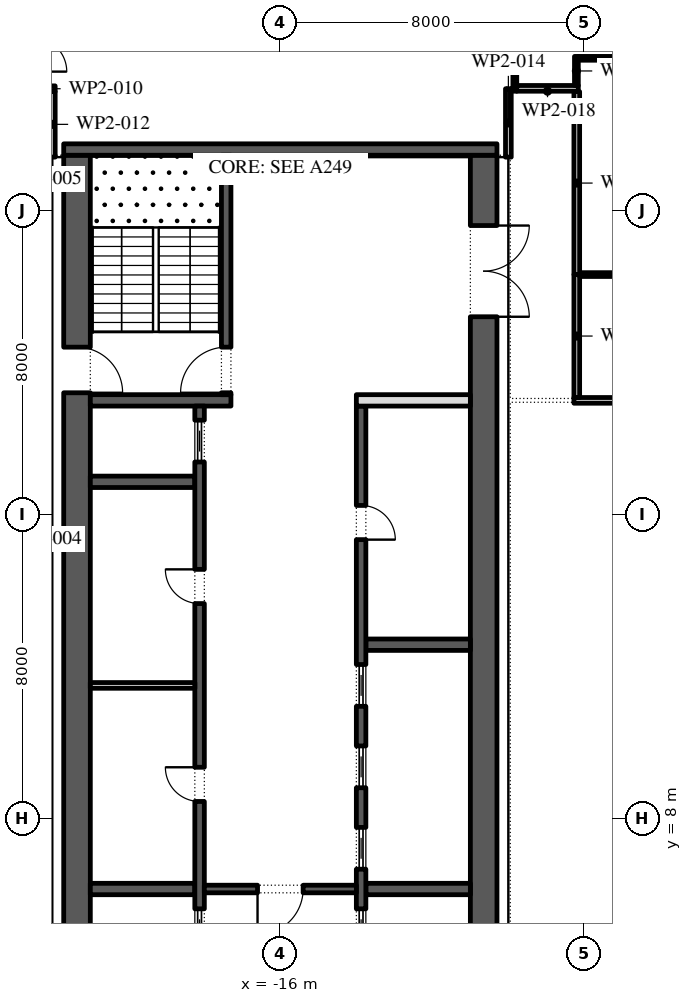
"""IFC4 building model, lengths in metres.
Left out: names, types, materials, properties, quantities, classifications, styles, units other than length and angle.
Written with IfcOpenShell. Run it as: python <this file> out.ifc"""

import sys

from ifc_helpers import new_model, si_unit, direction, frame, frame_2d, origin, place, context, subcontext, project, spatial, rectangle, extrude, element, fill, save


model = new_model("IFC4")
c1 = context("Model", 3, precision=1e-05, world=origin(), true_north=direction((0.0, 1.0)))
c2 = subcontext(c1, "Body", "Model", "MODEL_VIEW")
j1 = project(units=[si_unit("LENGTHUNIT", "METRE"), si_unit("PLANEANGLEUNIT", "RADIAN")], contexts=[c1])
p1 = place(None, origin())
s1 = spatial("IfcSite", under=j1, at=p1, CompositionType="ELEMENT")
p2 = place(p1, origin())
s2 = spatial("IfcBuilding", under=s1, at=p2, CompositionType="ELEMENT")
p3 = place(p2, frame((0.0, 0.0, 209.4)))
s3 = spatial("IfcBuildingStorey", under=s2, at=p3, CompositionType="ELEMENT", Elevation=209.4)
p4 = place(p3, frame((-33.157, 30.092, 0.0), z_axis=(0.0, 0.0, 1.0), x_axis=(0.224950279389, -0.974370243697, 0.0)))
e1 = element("IfcWall", 1, at=p4, inside=s3, PredefinedType="STANDARD", context=c2, shape_type="SweptSolid", body=[
    extrude(rectangle(XDim=49.5, YDim=0.3, at=frame_2d((24.75, 0.0))), origin(), (0.0, 0.0, 1.0), 4.0),
])
p5 = place(p4, frame((2.207, 0.0, 0.0)))
e2 = element("IfcOpeningElement", 2, at=p5, cuts=e1, PredefinedType="OPENING", context=c2, shape_type="SweptSolid", body=[
    extrude(rectangle(XDim=2.4, YDim=3.5, at=frame_2d((1.2, 1.75))), frame((0.0, 0.16, 0.0), z_axis=(0.0, -1.0, 0.0), x_axis=(1.0, 0.0, 0.0)), (0.0, 0.0, 1.0), 0.32),
])
p6 = place(p4, frame((8.121, 0.0, 0.45)))
e3 = element("IfcOpeningElement", 3, at=p6, cuts=e1, PredefinedType="OPENING", context=c2, shape_type="SweptSolid", body=[
    extrude(rectangle(XDim=4.5, YDim=2.825, at=frame_2d((2.25, 1.413))), frame((0.0, 0.16, 0.0), z_axis=(0.0, -1.0, 0.0), x_axis=(1.0, 0.0, 0.0)), (0.0, 0.0, 1.0), 0.32),
])
p7 = place(p4, frame((15.236, 0.0, 0.45)))
e4 = element("IfcOpeningElement", 4, at=p7, cuts=e1, PredefinedType="OPENING", context=c2, shape_type="SweptSolid", body=[
    extrude(rectangle(XDim=4.5, YDim=2.95, at=frame_2d((2.25, 1.475))), frame((0.0, 0.16, 0.0), z_axis=(0.0, -1.0, 0.0), x_axis=(1.0, 0.0, 0.0)), (0.0, 0.0, 1.0), 0.32),
])
p8 = place(p4, frame((22.35, 0.0, 0.45)))
e5 = element("IfcOpeningElement", 5, at=p8, cuts=e1, PredefinedType="OPENING", context=c2, shape_type="SweptSolid", body=[
    extrude(rectangle(XDim=4.5, YDim=3.0, at=frame_2d((2.25, 1.5))), frame((0.0, 0.16, 0.0), z_axis=(0.0, -1.0, 0.0), x_axis=(1.0, 0.0, 0.0)), (0.0, 0.0, 1.0), 0.32),
])
p9 = place(p4, frame((30.514, 0.0, 0.0)))
e6 = element("IfcOpeningElement", 6, at=p9, cuts=e1, PredefinedType="OPENING", context=c2, shape_type="SweptSolid", body=[
    extrude(rectangle(XDim=2.4, YDim=3.5, at=frame_2d((1.2, 1.75))), frame((0.0, 0.16, 0.0), z_axis=(0.0, -1.0, 0.0), x_axis=(1.0, 0.0, 0.0)), (0.0, 0.0, 1.0), 0.32),
])
p10 = place(p4, frame((36.579, 0.0, 0.45)))
e7 = element("IfcOpeningElement", 7, at=p10, cuts=e1, PredefinedType="OPENING", context=c2, shape_type="SweptSolid", body=[
    extrude(rectangle(XDim=4.5, YDim=3.05, at=frame_2d((2.25, 1.525))), frame((0.0, 0.16, 0.0), z_axis=(0.0, -1.0, 0.0), x_axis=(1.0, 0.0, 0.0)), (0.0, 0.0, 1.0), 0.32),
])
p11 = place(p4, frame((43.693, 0.0, 0.45)))
e8 = element("IfcOpeningElement", 8, at=p11, cuts=e1, PredefinedType="OPENING", context=c2, shape_type="SweptSolid", body=[
    extrude(rectangle(XDim=4.5, YDim=3.05, at=frame_2d((2.25, 1.525))), frame((0.0, 0.16, 0.0), z_axis=(0.0, -1.0, 0.0), x_axis=(1.0, 0.0, 0.0)), (0.0, 0.0, 1.0), 0.32),
])
p12 = place(p3, frame((-21.35, -2.45, 0.0), z_axis=(0.0, 0.0, 1.0), x_axis=(0.0, 1.0, 0.0)))
e9 = element("IfcWall", 9, at=p12, inside=s3, PredefinedType="SHEAR", context=c2, shape_type="SweptSolid", body=[
    extrude(rectangle(XDim=27.9, YDim=0.7, at=frame_2d((13.95, 0.0))), origin(), (0.0, 0.0, 1.0), 4.0),
])
p13 = place(p12, frame((5.05, 0.0, 0.0)))
e10 = element("IfcOpeningElement", 10, at=p13, cuts=e9, PredefinedType="OPENING", context=c2, shape_type="SweptSolid", body=[
    extrude(rectangle(XDim=1.2, YDim=2.1, at=frame_2d((0.6, 1.05))), frame((0.0, 0.36, 0.0), z_axis=(0.0, -1.0, 0.0), x_axis=(1.0, 0.0, 0.0)), (0.0, 0.0, 1.0), 0.72),
])
p14 = place(p12, frame((21.65, 0.0, 0.0)))
e11 = element("IfcOpeningElement", 11, at=p14, cuts=e9, PredefinedType="OPENING", context=c2, shape_type="SweptSolid", body=[
    extrude(rectangle(XDim=1.2, YDim=2.1, at=frame_2d((0.6, 1.05))), frame((0.0, 0.36, 0.0), z_axis=(0.0, -1.0, 0.0), x_axis=(1.0, 0.0, 0.0)), (0.0, 0.0, 1.0), 0.72),
])
p15 = place(p3, frame((-10.65, -2.45, 0.0), z_axis=(0.0, 0.0, 1.0), x_axis=(0.0, 1.0, 0.0)))
e12 = element("IfcWall", 12, at=p15, inside=s3, PredefinedType="SHEAR", context=c2, shape_type="SweptSolid", body=[
    extrude(rectangle(XDim=27.9, YDim=0.7, at=frame_2d((13.95, 0.0))), origin(), (0.0, 0.0, 1.0), 4.0),
])
p16 = place(p15, frame((23.65, 0.0, 0.0)))
e13 = element("IfcOpeningElement", 13, at=p16, cuts=e12, PredefinedType="OPENING", context=c2, shape_type="SweptSolid", body=[
    extrude(rectangle(XDim=2.4, YDim=2.1, at=frame_2d((1.2, 1.05))), frame((0.0, 0.36, 0.0), z_axis=(0.0, -1.0, 0.0), x_axis=(1.0, 0.0, 0.0)), (0.0, 0.0, 1.0), 0.72),
])
p17 = place(p15, frame((0.788, 0.0, 0.0)))
e14 = element("IfcOpeningElement", 14, at=p17, cuts=e12, PredefinedType="OPENING", context=c2, shape_type="SweptSolid", body=[
    extrude(rectangle(XDim=0.9, YDim=2.1, at=frame_2d((0.45, 1.05))), frame((0.0, 0.36, 0.0), z_axis=(0.0, -1.0, 0.0), x_axis=(1.0, 0.0, 0.0)), (0.0, 0.0, 1.0), 0.72),
])
p18 = place(p15, frame((3.962, 0.0, 0.0)))
e15 = element("IfcOpeningElement", 15, at=p18, cuts=e12, PredefinedType="OPENING", context=c2, shape_type="SweptSolid", body=[
    extrude(rectangle(XDim=1.0, YDim=2.1, at=frame_2d((0.5, 1.05))), frame((0.0, 0.36, 0.0), z_axis=(0.0, -1.0, 0.0), x_axis=(1.0, 0.0, 0.0)), (0.0, 0.0, 1.0), 0.72),
])
p19 = place(p3, frame((-21.7, 25.6, 0.0), z_axis=(0.0, 0.0, 1.0), x_axis=(1.0, 0.0, 0.0)))
e16 = element("IfcWall", 16, at=p19, inside=s3, PredefinedType="SHEAR", context=c2, shape_type="SweptSolid", body=[
    extrude(rectangle(XDim=11.4, YDim=0.3, at=frame_2d((5.7, 0.0))), origin(), (0.0, 0.0, 1.0), 4.0),
])
p20 = place(p3, frame((-21.0, 19.0, 0.0), z_axis=(0.0, 0.0, 1.0), x_axis=(1.0, 0.0, 0.0)))
e17 = element("IfcWall", 17, at=p20, inside=s3, PredefinedType="SHEAR", context=c2, shape_type="SweptSolid", body=[
    extrude(rectangle(XDim=3.7, YDim=0.3, at=frame_2d((1.85, 0.0))), origin(), (0.0, 0.0, 1.0), 4.0),
])
p21 = place(p3, frame((-17.425, 19.15, 0.0), z_axis=(0.0, 0.0, 1.0), x_axis=(0.0, 1.0, 0.0)))
e18 = element("IfcWall", 18, at=p21, inside=s3, PredefinedType="SHEAR", context=c2, shape_type="SweptSolid", body=[
    extrude(rectangle(XDim=6.3, YDim=0.25, at=frame_2d((3.15, 0.0))), origin(), (0.0, 0.0, 1.0), 4.0),
])
p22 = place(p21, frame((0.05, 0.0, 0.0)))
e19 = element("IfcOpeningElement", 19, at=p22, cuts=e18, PredefinedType="OPENING", context=c2, shape_type="SweptSolid", body=[
    extrude(rectangle(XDim=1.2, YDim=2.1, at=frame_2d((0.6, 1.05))), frame((0.0, 0.135, 0.0), z_axis=(0.0, -1.0, 0.0), x_axis=(1.0, 0.0, 0.0)), (0.0, 0.0, 1.0), 0.27),
])
for number, where, z_axis, x_axis in (
    (20, (-21.0, 6.143, 0.0), (0.0, 0.0, 1.0), (1.0, 0.0, 0.0)),
    (21, (-21.0, 16.857, 0.0), (0.0, 0.0, 1.0), (1.0, 0.0, 0.0)),
):
    element("IfcWall", number, at=place(p3, frame(where, z_axis=z_axis, x_axis=x_axis)), inside=s3, PredefinedType="SHEAR", context=c2, shape_type="SweptSolid", body=[
        extrude(rectangle(XDim=2.75, YDim=0.3, at=frame_2d((1.375, 0.0))), origin(), (0.0, 0.0, 1.0), 4.0),
    ])
p23 = place(p3, frame((-18.125, 4.15, 0.0), z_axis=(0.0, 0.0, 1.0), x_axis=(0.0, 1.0, 0.0)))
e22 = element("IfcWall", 22, at=p23, inside=s3, PredefinedType="SHEAR", context=c2, shape_type="SweptSolid", body=[
    extrude(rectangle(XDim=14.7, YDim=0.25, at=frame_2d((7.35, 0.0))), origin(), (0.0, 0.0, 1.0), 4.0),
])
p24 = place(p23, frame((4.296, 0.0, 0.0)))
e23 = element("IfcOpeningElement", 23, at=p24, cuts=e22, PredefinedType="OPENING", context=c2, shape_type="SweptSolid", body=[
    extrude(rectangle(XDim=0.9, YDim=2.1, at=frame_2d((0.45, 1.05))), frame((0.0, 0.135, 0.0), z_axis=(0.0, -1.0, 0.0), x_axis=(1.0, 0.0, 0.0)), (0.0, 0.0, 1.0), 0.27),
])
p25 = place(p23, frame((9.504, 0.0, 0.0)))
e24 = element("IfcOpeningElement", 24, at=p25, cuts=e22, PredefinedType="OPENING", context=c2, shape_type="SweptSolid", body=[
    extrude(rectangle(XDim=0.9, YDim=2.1, at=frame_2d((0.45, 1.05))), frame((0.0, 0.135, 0.0), z_axis=(0.0, -1.0, 0.0), x_axis=(1.0, 0.0, 0.0)), (0.0, 0.0, 1.0), 0.27),
])
p26 = place(p23, frame((0.371, 0.0, 0.0)))
e25 = element("IfcOpeningElement", 25, at=p26, cuts=e22, PredefinedType="OPENING", context=c2, shape_type="SweptSolid", body=[
    extrude(rectangle(XDim=1.1, YDim=2.1, at=frame_2d((0.55, 1.05))), frame((0.0, 0.135, 0.0), z_axis=(0.0, -1.0, 0.0), x_axis=(1.0, 0.0, 0.0)), (0.0, 0.0, 1.0), 0.27),
])
p27 = place(p23, frame((13.229, 0.0, 0.0)))
e26 = element("IfcOpeningElement", 26, at=p27, cuts=e22, PredefinedType="OPENING", context=c2, shape_type="SweptSolid", body=[
    extrude(rectangle(XDim=1.1, YDim=2.1, at=frame_2d((0.55, 1.05))), frame((0.0, 0.135, 0.0), z_axis=(0.0, -1.0, 0.0), x_axis=(1.0, 0.0, 0.0)), (0.0, 0.0, 1.0), 0.27),
])
p28 = place(p3, frame((-21.0, 11.5, 0.0), z_axis=(0.0, 0.0, 1.0), x_axis=(1.0, 0.0, 0.0)))
e27 = element("IfcWall", 27, at=p28, inside=s3, PredefinedType="PARTITIONING", context=c2, shape_type="SweptSolid", body=[
    extrude(rectangle(XDim=2.75, YDim=0.15, at=frame_2d((1.375, 0.0))), origin(), (0.0, 0.0, 1.0), 4.0),
])
for number, where, z_axis, x_axis in (
    (28, (-13.75, 6.143, 0.0), (0.0, 0.0, 1.0), (1.0, 0.0, 0.0)),
    (29, (-13.75, 12.571, 0.0), (0.0, 0.0, 1.0), (1.0, 0.0, 0.0)),
):
    element("IfcWall", number, at=place(p3, frame(where, z_axis=z_axis, x_axis=x_axis)), inside=s3, PredefinedType="SHEAR", context=c2, shape_type="SweptSolid", body=[
        extrude(rectangle(XDim=2.75, YDim=0.3, at=frame_2d((1.375, 0.0))), origin(), (0.0, 0.0, 1.0), 4.0),
    ])
p29 = place(p3, frame((-13.875, -2.45, 0.0), z_axis=(0.0, 0.0, 1.0), x_axis=(0.0, 1.0, 0.0)))
e30 = element("IfcWall", 30, at=p29, inside=s3, PredefinedType="SHEAR", context=c2, shape_type="SweptSolid", body=[
    extrude(rectangle(XDim=21.3, YDim=0.25, at=frame_2d((10.65, 0.0))), origin(), (0.0, 0.0, 1.0), 4.0),
])
p30 = place(p29, frame((17.786, 0.0, 0.0)))
e31 = element("IfcOpeningElement", 31, at=p30, cuts=e30, PredefinedType="OPENING", context=c2, shape_type="SweptSolid", body=[
    extrude(rectangle(XDim=0.9, YDim=2.1, at=frame_2d((0.45, 1.05))), frame((0.0, 0.135, 0.0), z_axis=(0.0, -1.0, 0.0), x_axis=(1.0, 0.0, 0.0)), (0.0, 0.0, 1.0), 0.27),
])
p31 = place(p29, frame((6.971, 0.0, 0.0)))
e32 = element("IfcOpeningElement", 32, at=p31, cuts=e30, PredefinedType="OPENING", context=c2, shape_type="SweptSolid", body=[
    extrude(rectangle(XDim=1.1, YDim=2.1, at=frame_2d((0.55, 1.05))), frame((0.0, 0.135, 0.0), z_axis=(0.0, -1.0, 0.0), x_axis=(1.0, 0.0, 0.0)), (0.0, 0.0, 1.0), 0.27),
])
p32 = place(p29, frame((9.114, 0.0, 0.0)))
e33 = element("IfcOpeningElement", 33, at=p32, cuts=e30, PredefinedType="OPENING", context=c2, shape_type="SweptSolid", body=[
    extrude(rectangle(XDim=1.1, YDim=2.1, at=frame_2d((0.55, 1.05))), frame((0.0, 0.135, 0.0), z_axis=(0.0, -1.0, 0.0), x_axis=(1.0, 0.0, 0.0)), (0.0, 0.0, 1.0), 0.27),
])
p33 = place(p29, frame((11.257, 0.0, 0.0)))
e34 = element("IfcOpeningElement", 34, at=p33, cuts=e30, PredefinedType="OPENING", context=c2, shape_type="SweptSolid", body=[
    extrude(rectangle(XDim=1.1, YDim=2.1, at=frame_2d((0.55, 1.05))), frame((0.0, 0.135, 0.0), z_axis=(0.0, -1.0, 0.0), x_axis=(1.0, 0.0, 0.0)), (0.0, 0.0, 1.0), 0.27),
])
p34 = place(p29, frame((13.4, 0.0, 0.0)))
e35 = element("IfcOpeningElement", 35, at=p34, cuts=e30, PredefinedType="OPENING", context=c2, shape_type="SweptSolid", body=[
    extrude(rectangle(XDim=1.1, YDim=2.1, at=frame_2d((0.55, 1.05))), frame((0.0, 0.135, 0.0), z_axis=(0.0, -1.0, 0.0), x_axis=(1.0, 0.0, 0.0)), (0.0, 0.0, 1.0), 0.27),
])
p35 = place(p3, frame((-14.0, 19.0, 0.0), z_axis=(0.0, 0.0, 1.0), x_axis=(1.0, 0.0, 0.0)))
e36 = element("IfcWall", 36, at=p35, inside=s3, PredefinedType="PARTITIONING", context=c2, shape_type="SweptSolid", body=[
    extrude(rectangle(XDim=3.0, YDim=0.3, at=frame_2d((1.5, 0.0))), origin(), (0.0, 0.0, 1.0), 4.0),
])
p36 = place(p3, frame((-18.0, 6.143, 0.0), z_axis=(0.0, 0.0, 1.0), x_axis=(1.0, 0.0, 0.0)))
e37 = element("IfcWall", 37, at=p36, inside=s3, PredefinedType="SHEAR", context=c2, shape_type="SweptSolid", body=[
    extrude(rectangle(XDim=4.0, YDim=0.2, at=frame_2d((2.0, 0.0))), origin(), (0.0, 0.0, 1.0), 4.0),
])
p37 = place(p36, frame((1.4, 0.0, 0.0)))
e38 = element("IfcOpeningElement", 38, at=p37, cuts=e37, PredefinedType="OPENING", context=c2, shape_type="SweptSolid", body=[
    extrude(rectangle(XDim=1.2, YDim=2.1, at=frame_2d((0.6, 1.05))), frame((0.0, 0.11, 0.0), z_axis=(0.0, -1.0, 0.0), x_axis=(1.0, 0.0, 0.0)), (0.0, 0.0, 1.0), 0.22),
])
p38 = place(p3, frame((-22.47, 27.2, 0.0), z_axis=(0.0, 0.0, 1.0), x_axis=(1.0, 0.0, 0.0)))
e39 = element("IfcWall", 39, at=p38, inside=s3, PredefinedType="PARTITIONING", context=c2, shape_type="SweptSolid", body=[
    extrude(rectangle(XDim=0.545, YDim=0.15, at=frame_2d((0.272, 0.0))), origin(), (0.0, 0.0, 1.0), 4.0),
])
p39 = place(p3, frame((-22.0, 27.125, 0.0), z_axis=(0.0, 0.0, 1.0), x_axis=(0.0, -1.0, 0.0)))
e40 = element("IfcWall", 40, at=p39, inside=s3, PredefinedType="PARTITIONING", context=c2, shape_type="SweptSolid", body=[
    extrude(rectangle(XDim=1.725, YDim=0.15, at=frame_2d((0.863, 0.0))), origin(), (0.0, 0.0, 1.0), 4.0),
])
p40 = place(p3, frame((-10.0, 25.4, 0.0), z_axis=(0.0, 0.0, 1.0), x_axis=(0.0, 1.0, 0.0)))
e41 = element("IfcWall", 41, at=p40, inside=s3, PredefinedType="PARTITIONING", context=c2, shape_type="SweptSolid", body=[
    extrude(rectangle(XDim=1.8, YDim=0.15, at=frame_2d((0.9, 0.0))), origin(), (0.0, 0.0, 1.0), 4.0),
])
p41 = place(p3, frame((-9.83, 27.135, 0.0), z_axis=(0.0, 0.0, 1.0), x_axis=(0.0, 1.0, 0.0)))
e42 = element("IfcWall", 42, at=p41, inside=s3, PredefinedType="PARTITIONING", context=c2, shape_type="SweptSolid", body=[
    extrude(rectangle(XDim=3.335, YDim=0.1, at=frame_2d((1.667, 0.0))), origin(), (0.0, 0.0, 1.0), 4.0),
])
p42 = place(p3, frame((-9.78, 27.21, 0.0), z_axis=(0.0, 0.0, 1.0), x_axis=(1.0, 0.0, 0.0)))
e43 = element("IfcWall", 43, at=p42, inside=s3, PredefinedType="PARTITIONING", context=c2, shape_type="SweptSolid", body=[
    extrude(rectangle(XDim=1.62, YDim=0.15, at=frame_2d((0.81, 0.0))), origin(), (0.0, 0.0, 1.0), 4.0),
])
p43 = place(p3, frame((-8.21, 27.285, 0.0), z_axis=(0.0, 0.0, 1.0), x_axis=(0.0, 1.0, 0.0)))
e44 = element("IfcWall", 44, at=p43, inside=s3, PredefinedType="PARTITIONING", context=c2, shape_type="SweptSolid", body=[
    extrude(rectangle(XDim=0.765, YDim=0.1, at=frame_2d((0.383, 0.0))), origin(), (0.0, 0.0, 1.0), 4.0),
])
p44 = place(p3, frame((-8.16, 28.0, 0.0), z_axis=(0.0, 0.0, 1.0), x_axis=(1.0, 0.0, 0.0)))
e45 = element("IfcWall", 45, at=p44, inside=s3, PredefinedType="PARTITIONING", context=c2, shape_type="SweptSolid", body=[
    extrude(rectangle(XDim=7.245, YDim=0.1, at=frame_2d((3.623, 0.0))), origin(), (0.0, 0.0, 1.0), 4.0),
])
p45 = place(p3, frame((-8.275, 19.0, 0.0), z_axis=(0.0, 0.0, 1.0), x_axis=(1.0, 0.0, 0.0)))
e46 = element("IfcWall", 46, at=p45, inside=s3, PredefinedType="PARTITIONING", context=c2, shape_type="SweptSolid", body=[
    extrude(rectangle(XDim=7.36, YDim=0.15, at=frame_2d((3.68, 0.0))), origin(), (0.0, 0.0, 1.0), 4.0),
])
p46 = place(p45, frame((1.635, 0.0, 0.0)))
e47 = element("IfcOpeningElement", 47, at=p46, cuts=e46, PredefinedType="OPENING", context=c2, shape_type="SweptSolid", body=[
    extrude(rectangle(XDim=1.0, YDim=2.1, at=frame_2d((0.5, 1.05))), frame((0.0, 0.085, 0.0), z_axis=(0.0, -1.0, 0.0), x_axis=(1.0, 0.0, 0.0)), (0.0, 0.0, 1.0), 0.17),
])
p47 = place(p3, frame((-8.2, 22.31, 0.0), z_axis=(0.0, 0.0, 1.0), x_axis=(0.0, -1.0, 0.0)))
e48 = element("IfcWall", 48, at=p47, inside=s3, PredefinedType="PARTITIONING", context=c2, shape_type="SweptSolid", body=[
    extrude(rectangle(XDim=3.235, YDim=0.15, at=frame_2d((1.618, 0.0))), origin(), (0.0, 0.0, 1.0), 4.0),
])
p48 = place(p3, frame((-8.125, 22.31, 0.0), z_axis=(0.0, 0.0, 1.0), x_axis=(1.0, 0.0, 0.0)))
e49 = element("IfcWall", 49, at=p48, inside=s3, PredefinedType="PARTITIONING", context=c2, shape_type="SweptSolid", body=[
    extrude(rectangle(XDim=7.21, YDim=0.1, at=frame_2d((3.605, 0.0))), origin(), (0.0, 0.0, 1.0), 4.0),
])
p49 = place(p3, frame((-8.2, 27.125, 0.0), z_axis=(0.0, 0.0, 1.0), x_axis=(0.0, -1.0, 0.0)))
e50 = element("IfcWall", 50, at=p49, inside=s3, PredefinedType="PARTITIONING", context=c2, shape_type="SweptSolid", body=[
    extrude(rectangle(XDim=4.815, YDim=0.15, at=frame_2d((2.407, 0.0))), origin(), (0.0, 0.0, 1.0), 4.0),
])
p50 = place(p24, origin())
e51 = element("IfcDoor", 51, at=p50, inside=s3, OperationType="SINGLE_SWING_LEFT", PredefinedType="DOOR", context=c2, shape_type="SweptSolid", body=[
    extrude(rectangle(XDim=0.9, YDim=2.1, at=frame_2d((0.45, 1.05))), frame((0.0, 0.125, 0.0), z_axis=(0.0, -1.0, 0.0), x_axis=(1.0, 0.0, 0.0)), (0.0, 0.0, 1.0), 0.05),
])
fill(e23, e51)
p51 = place(p25, origin())
e52 = element("IfcDoor", 52, at=p51, inside=s3, OperationType="SINGLE_SWING_LEFT", PredefinedType="DOOR", context=c2, shape_type="SweptSolid", body=[
    extrude(rectangle(XDim=0.9, YDim=2.1, at=frame_2d((0.45, 1.05))), frame((0.0, 0.125, 0.0), z_axis=(0.0, -1.0, 0.0), x_axis=(1.0, 0.0, 0.0)), (0.0, 0.0, 1.0), 0.05),
])
fill(e24, e52)
p52 = place(p26, origin())
e53 = element("IfcDoor", 53, at=p52, inside=s3, OperationType="SLIDING_TO_LEFT", PredefinedType="DOOR", context=c2, shape_type="SweptSolid", body=[
    extrude(rectangle(XDim=1.1, YDim=2.1, at=frame_2d((0.55, 1.05))), frame((0.0, 0.025, 0.0), z_axis=(0.0, -1.0, 0.0), x_axis=(1.0, 0.0, 0.0)), (0.0, 0.0, 1.0), 0.05),
])
fill(e25, e53)
p53 = place(p27, origin())
e54 = element("IfcDoor", 54, at=p53, inside=s3, OperationType="SLIDING_TO_LEFT", PredefinedType="DOOR", context=c2, shape_type="SweptSolid", body=[
    extrude(rectangle(XDim=1.1, YDim=2.1, at=frame_2d((0.55, 1.05))), frame((0.0, 0.025, 0.0), z_axis=(0.0, -1.0, 0.0), x_axis=(1.0, 0.0, 0.0)), (0.0, 0.0, 1.0), 0.05),
])
fill(e26, e54)
p54 = place(p30, frame((0.9, -0.2, 0.0), z_axis=(0.0, 0.0, 1.0), x_axis=(-1.0, 0.0, 0.0)))
e55 = element("IfcDoor", 55, at=p54, inside=s3, OperationType="SINGLE_SWING_LEFT", PredefinedType="DOOR", context=c2, shape_type="SweptSolid", body=[
    extrude(rectangle(XDim=0.9, YDim=2.1, at=frame_2d((0.45, 1.05))), frame((0.0, -0.075, 0.0), z_axis=(0.0, -1.0, 0.0), x_axis=(1.0, 0.0, 0.0)), (0.0, 0.0, 1.0), 0.05),
])
fill(e31, e55)
p55 = place(p31, origin())
e56 = element("IfcDoor", 56, at=p55, inside=s3, OperationType="SLIDING_TO_LEFT", PredefinedType="DOOR", context=c2, shape_type="SweptSolid", body=[
    extrude(rectangle(XDim=1.1, YDim=2.1, at=frame_2d((0.55, 1.05))), frame((0.0, 0.025, 0.0), z_axis=(0.0, -1.0, 0.0), x_axis=(1.0, 0.0, 0.0)), (0.0, 0.0, 1.0), 0.05),
])
fill(e32, e56)
p56 = place(p32, origin())
e57 = element("IfcDoor", 57, at=p56, inside=s3, OperationType="SLIDING_TO_LEFT", PredefinedType="DOOR", context=c2, shape_type="SweptSolid", body=[
    extrude(rectangle(XDim=1.1, YDim=2.1, at=frame_2d((0.55, 1.05))), frame((0.0, 0.025, 0.0), z_axis=(0.0, -1.0, 0.0), x_axis=(1.0, 0.0, 0.0)), (0.0, 0.0, 1.0), 0.05),
])
fill(e33, e57)
p57 = place(p33, origin())
e58 = element("IfcDoor", 58, at=p57, inside=s3, OperationType="SLIDING_TO_LEFT", PredefinedType="DOOR", context=c2, shape_type="SweptSolid", body=[
    extrude(rectangle(XDim=1.1, YDim=2.1, at=frame_2d((0.55, 1.05))), frame((0.0, 0.025, 0.0), z_axis=(0.0, -1.0, 0.0), x_axis=(1.0, 0.0, 0.0)), (0.0, 0.0, 1.0), 0.05),
])
fill(e34, e58)
p58 = place(p34, origin())
e59 = element("IfcDoor", 59, at=p58, inside=s3, OperationType="SLIDING_TO_LEFT", PredefinedType="DOOR", context=c2, shape_type="SweptSolid", body=[
    extrude(rectangle(XDim=1.1, YDim=2.1, at=frame_2d((0.55, 1.05))), frame((0.0, 0.025, 0.0), z_axis=(0.0, -1.0, 0.0), x_axis=(1.0, 0.0, 0.0)), (0.0, 0.0, 1.0), 0.05),
])
fill(e35, e59)
p59 = place(p37, frame((1.2, 0.0, 0.0), z_axis=(0.0, 0.0, 1.0), x_axis=(-1.0, 0.0, 0.0)))
e60 = element("IfcDoor", 60, at=p59, inside=s3, OperationType="SINGLE_SWING_LEFT", PredefinedType="DOOR", context=c2, shape_type="SweptSolid", body=[
    extrude(rectangle(XDim=1.2, YDim=2.1, at=frame_2d((0.6, 1.05))), frame((0.0, 0.025, 0.0), z_axis=(0.0, -1.0, 0.0), x_axis=(1.0, 0.0, 0.0)), (0.0, 0.0, 1.0), 0.05),
])
fill(e38, e60)
p60 = place(p16, frame((2.4, 0.0, 0.0), z_axis=(0.0, 0.0, 1.0), x_axis=(-1.0, 0.0, 0.0)))
e61 = element("IfcDoor", 61, at=p60, inside=s3, OperationType="DOUBLE_DOOR_SINGLE_SWING", PredefinedType="DOOR", context=c2, shape_type="SweptSolid", body=[
    extrude(rectangle(XDim=2.4, YDim=2.1, at=frame_2d((1.2, 1.05))), frame((0.0, 0.025, 0.0), z_axis=(0.0, -1.0, 0.0), x_axis=(1.0, 0.0, 0.0)), (0.0, 0.0, 1.0), 0.05),
])
fill(e13, e61)
p61 = place(p22, origin())
e62 = element("IfcDoor", 62, at=p61, inside=s3, OperationType="SINGLE_SWING_RIGHT", PredefinedType="DOOR", context=c2, shape_type="SweptSolid", body=[
    extrude(rectangle(XDim=1.2, YDim=2.1, at=frame_2d((0.6, 1.05))), frame((0.0, 0.025, 0.0), z_axis=(0.0, -1.0, 0.0), x_axis=(1.0, 0.0, 0.0)), (0.0, 0.0, 1.0), 0.05),
])
fill(e19, e62)
p62 = place(p14, frame((1.2, 0.0, 0.0), z_axis=(0.0, 0.0, 1.0), x_axis=(-1.0, 0.0, 0.0)))
e63 = element("IfcDoor", 63, at=p62, inside=s3, OperationType="SINGLE_SWING_LEFT", PredefinedType="DOOR", context=c2, shape_type="SweptSolid", body=[
    extrude(rectangle(XDim=1.2, YDim=2.1, at=frame_2d((0.6, 1.05))), frame((0.0, 0.025, 0.0), z_axis=(0.0, -1.0, 0.0), x_axis=(1.0, 0.0, 0.0)), (0.0, 0.0, 1.0), 0.05),
])
fill(e11, e63)
save(model, sys.argv[1])
